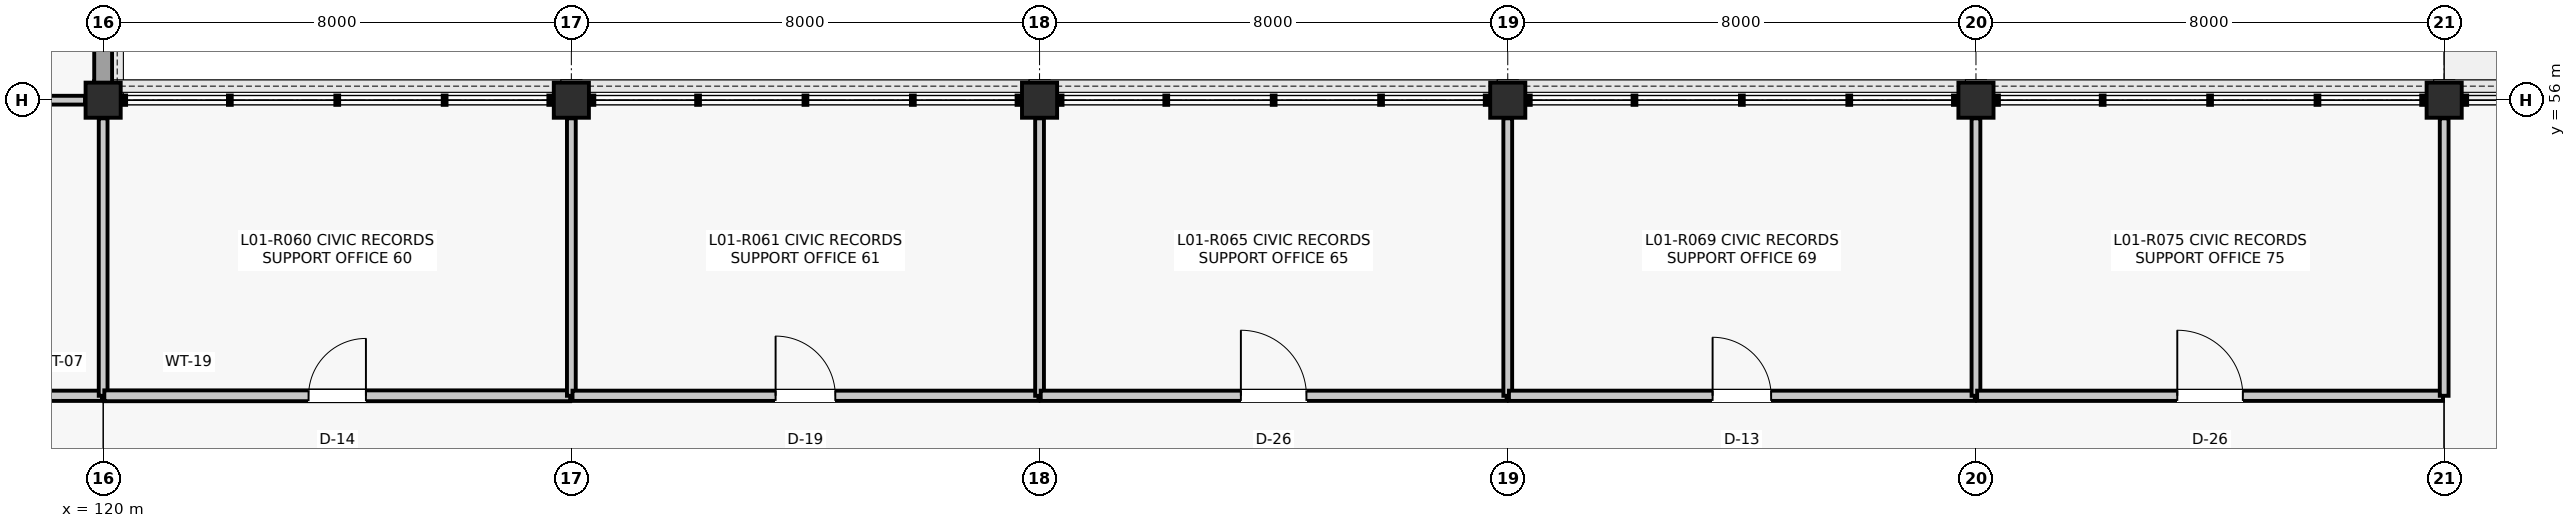
"""IFC4 building model, lengths in metres.
Left out: names, types, materials, properties, quantities, classifications, styles, units other than length and angle.
Written with IfcOpenShell. Run it as: python <this file> out.ifc"""

import sys

from ifc_helpers import new_model, si_unit, direction, frame, frame_2d, origin, origin_2d, place, context, subcontext, project, spatial, rectangle, extrude, element, fill, save


model = new_model("IFC4")
c1 = context("Model", 3, precision=1e-05, world=origin(), true_north=direction((0.0, 1.0)))
c2 = subcontext(c1, "Body", "Model", "MODEL_VIEW")
j1 = project(units=[si_unit("LENGTHUNIT", "METRE"), si_unit("PLANEANGLEUNIT", "RADIAN")], contexts=[c1])
p1 = place(None, origin())
s1 = spatial("IfcSite", under=j1, at=p1, CompositionType="ELEMENT")
p2 = place(p1, origin())
s2 = spatial("IfcBuilding", under=s1, at=p2, CompositionType="ELEMENT")
p3 = place(p2, frame((0.0, 0.0, 5.28)))
s3 = spatial("IfcBuildingStorey", under=s2, at=p3, CompositionType="ELEMENT", Elevation=5.28)
for number, where, z_axis, x_axis in (
    (1, (120.0, 56.0, 0.0), (0.0, 0.0, 1.0), (1.0, 0.0, 0.0)),
    (2, (128.0, 56.0, 0.0), (0.0, 0.0, 1.0), (1.0, 0.0, 0.0)),
    (3, (136.0, 56.0, 0.0), (0.0, 0.0, 1.0), (1.0, 0.0, 0.0)),
    (4, (144.0, 56.0, 0.0), (0.0, 0.0, 1.0), (1.0, 0.0, 0.0)),
    (5, (152.0, 56.0, 0.0), (0.0, 0.0, 1.0), (1.0, 0.0, 0.0)),
    (6, (160.0, 56.0, 0.0), (0.0, 0.0, 1.0), (1.0, 0.0, 0.0)),
):
    element("IfcColumn", number, at=place(p3, frame(where, z_axis=z_axis, x_axis=x_axis)), inside=s3, PredefinedType="COLUMN", context=c2, shape_type="SweptSolid", body=[
        extrude(rectangle(XDim=0.6, YDim=0.6, at=origin_2d()), origin(), (0.0, 0.0, 1.0), 4.62),
    ])
p4 = place(p3, frame((120.0, 56.285, 0.0), z_axis=(0.0, 0.0, 1.0), x_axis=(0.0, 1.0, 0.0)))
e7 = element("IfcWall", 7, at=p4, inside=s3, PredefinedType="SOLIDWALL", context=c2, shape_type="SweptSolid", body=[
    extrude(rectangle(XDim=7.43, YDim=0.305, at=frame_2d((3.715, 0.0))), origin(), (0.0, 0.0, 1.0), 3.977),
])
p5 = place(p4, frame((2.665, 0.0, 0.9)))
e8 = element("IfcOpeningElement", 8, at=p5, cuts=e7, PredefinedType="OPENING", context=c2, shape_type="SweptSolid", body=[
    extrude(rectangle(XDim=2.1, YDim=2.4, at=frame_2d((1.05, 1.2))), frame((0.0, 0.162, 0.0), z_axis=(0.0, -1.0, 0.0), x_axis=(1.0, 0.0, 0.0)), (0.0, 0.0, 1.0), 0.325),
])
p6 = place(p3, frame((114.9, 50.95, 0.0), z_axis=(0.0, 0.0, 1.0), x_axis=(1.0, 0.0, 0.0)))
e9 = element("IfcWall", 9, at=p6, inside=s3, PredefinedType="PARTITIONING", context=c2, shape_type="SweptSolid", body=[
    extrude(rectangle(XDim=5.08, YDim=0.175, at=frame_2d((2.54, 0.0))), origin(), (0.0, 0.0, 1.0), 3.857),
])
p7 = place(p6, frame((2.07, 0.0, 0.0)))
e10 = element("IfcOpeningElement", 10, at=p7, cuts=e9, PredefinedType="OPENING", context=c2, shape_type="SweptSolid", body=[
    extrude(rectangle(XDim=0.94, YDim=2.12, at=frame_2d((0.47, 1.06))), frame((0.0, 0.097, 0.0), z_axis=(0.0, -1.0, 0.0), x_axis=(1.0, 0.0, 0.0)), (0.0, 0.0, 1.0), 0.195),
])
p8 = place(p3, frame((114.95, 56.0, 0.0), z_axis=(0.0, 0.0, 1.0), x_axis=(1.0, 0.0, 0.0)))
e11 = element("IfcWall", 11, at=p8, inside=s3, PredefinedType="PARTITIONING", context=c2, shape_type="SweptSolid", body=[
    extrude(rectangle(XDim=4.74, YDim=0.15, at=frame_2d((2.37, 0.0))), origin(), (0.0, 0.0, 1.0), 3.787),
])
p9 = place(p3, frame((120.0, 50.95, 0.0), z_axis=(0.0, 0.0, 1.0), x_axis=(0.0, 1.0, 0.0)))
e12 = element("IfcWall", 12, at=p9, inside=s3, PredefinedType="PARTITIONING", context=c2, shape_type="SweptSolid", body=[
    extrude(rectangle(XDim=4.74, YDim=0.15, at=frame_2d((2.37, 0.0))), origin(), (0.0, 0.0, 1.0), 3.857),
])
p10 = place(p3, frame((120.02, 50.95, 0.0), z_axis=(0.0, 0.0, 1.0), x_axis=(1.0, 0.0, 0.0)))
e13 = element("IfcWall", 13, at=p10, inside=s3, PredefinedType="PARTITIONING", context=c2, shape_type="SweptSolid", body=[
    extrude(rectangle(XDim=7.96, YDim=0.185, at=frame_2d((3.98, 0.0))), origin(), (0.0, 0.0, 1.0), 3.781),
])
p11 = place(p10, frame((3.49, 0.0, 0.0)))
e14 = element("IfcOpeningElement", 14, at=p11, cuts=e13, PredefinedType="OPENING", context=c2, shape_type="SweptSolid", body=[
    extrude(rectangle(XDim=0.98, YDim=2.15, at=frame_2d((0.49, 1.075))), frame((0.0, 0.103, 0.0), z_axis=(0.0, -1.0, 0.0), x_axis=(1.0, 0.0, 0.0)), (0.0, 0.0, 1.0), 0.205),
])
p12 = place(p3, frame((128.0, 50.95, 0.0), z_axis=(0.0, 0.0, 1.0), x_axis=(0.0, 1.0, 0.0)))
e15 = element("IfcWall", 15, at=p12, inside=s3, PredefinedType="PARTITIONING", context=c2, shape_type="SweptSolid", body=[
    extrude(rectangle(XDim=4.74, YDim=0.15, at=frame_2d((2.37, 0.0))), origin(), (0.0, 0.0, 1.0), 3.781),
])
p13 = place(p3, frame((128.02, 50.95, 0.0), z_axis=(0.0, 0.0, 1.0), x_axis=(1.0, 0.0, 0.0)))
e16 = element("IfcWall", 16, at=p13, inside=s3, PredefinedType="PARTITIONING", context=c2, shape_type="SweptSolid", body=[
    extrude(rectangle(XDim=7.96, YDim=0.175, at=frame_2d((3.98, 0.0))), origin(), (0.0, 0.0, 1.0), 3.781),
])
p14 = place(p13, frame((3.47, 0.0, 0.0)))
e17 = element("IfcOpeningElement", 17, at=p14, cuts=e16, PredefinedType="OPENING", context=c2, shape_type="SweptSolid", body=[
    extrude(rectangle(XDim=1.02, YDim=2.2, at=frame_2d((0.51, 1.1))), frame((0.0, 0.097, 0.0), z_axis=(0.0, -1.0, 0.0), x_axis=(1.0, 0.0, 0.0)), (0.0, 0.0, 1.0), 0.195),
])
p15 = place(p3, frame((136.0, 50.95, 0.0), z_axis=(0.0, 0.0, 1.0), x_axis=(0.0, 1.0, 0.0)))
e18 = element("IfcWall", 18, at=p15, inside=s3, PredefinedType="PARTITIONING", context=c2, shape_type="SweptSolid", body=[
    extrude(rectangle(XDim=4.74, YDim=0.15, at=frame_2d((2.37, 0.0))), origin(), (0.0, 0.0, 1.0), 3.851),
])
p16 = place(p3, frame((136.02, 50.95, 0.0), z_axis=(0.0, 0.0, 1.0), x_axis=(1.0, 0.0, 0.0)))
e19 = element("IfcWall", 19, at=p16, inside=s3, PredefinedType="PARTITIONING", context=c2, shape_type="SweptSolid", body=[
    extrude(rectangle(XDim=7.96, YDim=0.175, at=frame_2d((3.98, 0.0))), origin(), (0.0, 0.0, 1.0), 3.787),
])
p17 = place(p16, frame((3.42, 0.0, 0.0)))
e20 = element("IfcOpeningElement", 20, at=p17, cuts=e19, PredefinedType="OPENING", context=c2, shape_type="SweptSolid", body=[
    extrude(rectangle(XDim=1.12, YDim=2.22, at=frame_2d((0.56, 1.11))), frame((0.0, 0.097, 0.0), z_axis=(0.0, -1.0, 0.0), x_axis=(1.0, 0.0, 0.0)), (0.0, 0.0, 1.0), 0.195),
])
p18 = place(p3, frame((144.0, 50.95, 0.0), z_axis=(0.0, 0.0, 1.0), x_axis=(0.0, 1.0, 0.0)))
e21 = element("IfcWall", 21, at=p18, inside=s3, PredefinedType="PARTITIONING", context=c2, shape_type="SweptSolid", body=[
    extrude(rectangle(XDim=4.74, YDim=0.15, at=frame_2d((2.37, 0.0))), origin(), (0.0, 0.0, 1.0), 3.787),
])
p19 = place(p3, frame((144.02, 50.95, 0.0), z_axis=(0.0, 0.0, 1.0), x_axis=(1.0, 0.0, 0.0)))
e22 = element("IfcWall", 22, at=p19, inside=s3, PredefinedType="PARTITIONING", context=c2, shape_type="SweptSolid", body=[
    extrude(rectangle(XDim=7.96, YDim=0.175, at=frame_2d((3.98, 0.0))), origin(), (0.0, 0.0, 1.0), 3.787),
])
p20 = place(p19, frame((3.48, 0.0, 0.0)))
e23 = element("IfcOpeningElement", 23, at=p20, cuts=e22, PredefinedType="OPENING", context=c2, shape_type="SweptSolid", body=[
    extrude(rectangle(XDim=1.0, YDim=2.15, at=frame_2d((0.5, 1.075))), frame((0.0, 0.097, 0.0), z_axis=(0.0, -1.0, 0.0), x_axis=(1.0, 0.0, 0.0)), (0.0, 0.0, 1.0), 0.195),
])
p21 = place(p3, frame((152.0, 50.95, 0.0), z_axis=(0.0, 0.0, 1.0), x_axis=(0.0, 1.0, 0.0)))
e24 = element("IfcWall", 24, at=p21, inside=s3, PredefinedType="PARTITIONING", context=c2, shape_type="SweptSolid", body=[
    extrude(rectangle(XDim=4.74, YDim=0.15, at=frame_2d((2.37, 0.0))), origin(), (0.0, 0.0, 1.0), 3.857),
])
p22 = place(p3, frame((152.02, 50.95, 0.0), z_axis=(0.0, 0.0, 1.0), x_axis=(1.0, 0.0, 0.0)))
e25 = element("IfcWall", 25, at=p22, inside=s3, PredefinedType="PARTITIONING", context=c2, shape_type="SweptSolid", body=[
    extrude(rectangle(XDim=7.96, YDim=0.175, at=frame_2d((3.98, 0.0))), origin(), (0.0, 0.0, 1.0), 3.781),
])
p23 = place(p22, frame((3.42, 0.0, 0.0)))
e26 = element("IfcOpeningElement", 26, at=p23, cuts=e25, PredefinedType="OPENING", context=c2, shape_type="SweptSolid", body=[
    extrude(rectangle(XDim=1.12, YDim=2.22, at=frame_2d((0.56, 1.11))), frame((0.0, 0.097, 0.0), z_axis=(0.0, -1.0, 0.0), x_axis=(1.0, 0.0, 0.0)), (0.0, 0.0, 1.0), 0.195),
])
p24 = place(p3, frame((160.0, 50.95, 0.0), z_axis=(0.0, 0.0, 1.0), x_axis=(0.0, 1.0, 0.0)))
e27 = element("IfcWall", 27, at=p24, inside=s3, PredefinedType="PARTITIONING", context=c2, shape_type="SweptSolid", body=[
    extrude(rectangle(XDim=4.74, YDim=0.15, at=frame_2d((2.37, 0.0))), origin(), (0.0, 0.0, 1.0), 3.781),
])
p25 = place(p11, origin())
e28 = element("IfcDoor", 28, at=p25, inside=s3, OperationType="SINGLE_SWING_RIGHT", PredefinedType="DOOR", context=c2, shape_type="SweptSolid", body=[
    extrude(rectangle(XDim=0.98, YDim=2.15, at=frame_2d((0.49, 1.075))), frame((0.0, 0.025, 0.0), z_axis=(0.0, -1.0, 0.0), x_axis=(1.0, 0.0, 0.0)), (0.0, 0.0, 1.0), 0.05),
])
fill(e14, e28)
p26 = place(p14, origin())
e29 = element("IfcDoor", 29, at=p26, inside=s3, OperationType="SINGLE_SWING_LEFT", PredefinedType="DOOR", context=c2, shape_type="SweptSolid", body=[
    extrude(rectangle(XDim=1.02, YDim=2.2, at=frame_2d((0.51, 1.1))), frame((0.0, 0.025, 0.0), z_axis=(0.0, -1.0, 0.0), x_axis=(1.0, 0.0, 0.0)), (0.0, 0.0, 1.0), 0.05),
])
fill(e17, e29)
p27 = place(p17, origin())
e30 = element("IfcDoor", 30, at=p27, inside=s3, OperationType="SINGLE_SWING_LEFT", PredefinedType="DOOR", context=c2, shape_type="SweptSolid", body=[
    extrude(rectangle(XDim=1.12, YDim=2.22, at=frame_2d((0.56, 1.11))), frame((0.0, 0.025, 0.0), z_axis=(0.0, -1.0, 0.0), x_axis=(1.0, 0.0, 0.0)), (0.0, 0.0, 1.0), 0.05),
])
fill(e20, e30)
p28 = place(p20, origin())
e31 = element("IfcDoor", 31, at=p28, inside=s3, OperationType="SINGLE_SWING_LEFT", PredefinedType="DOOR", context=c2, shape_type="SweptSolid", body=[
    extrude(rectangle(XDim=1.0, YDim=2.15, at=frame_2d((0.5, 1.075))), frame((0.0, 0.025, 0.0), z_axis=(0.0, -1.0, 0.0), x_axis=(1.0, 0.0, 0.0)), (0.0, 0.0, 1.0), 0.05),
])
fill(e23, e31)
p29 = place(p23, origin())
e32 = element("IfcDoor", 32, at=p29, inside=s3, OperationType="SINGLE_SWING_LEFT", PredefinedType="DOOR", context=c2, shape_type="SweptSolid", body=[
    extrude(rectangle(XDim=1.12, YDim=2.22, at=frame_2d((0.56, 1.11))), frame((0.0, 0.025, 0.0), z_axis=(0.0, -1.0, 0.0), x_axis=(1.0, 0.0, 0.0)), (0.0, 0.0, 1.0), 0.05),
])
fill(e26, e32)
save(model, sys.argv[1])
